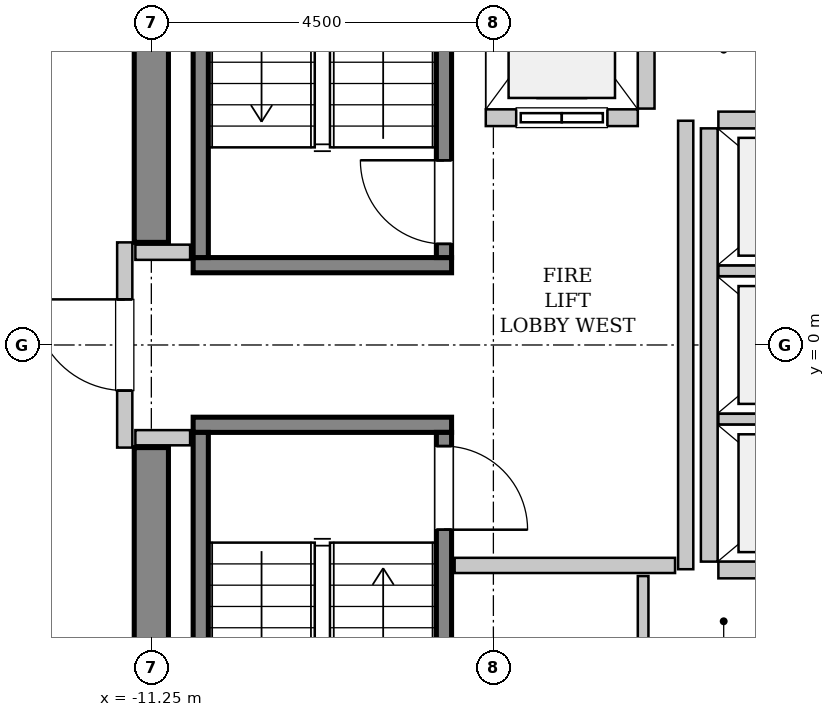
"""IFC4 building model, lengths in metres.
Left out: names, types, materials, properties, quantities, classifications, styles, units other than length and angle.
Written with IfcOpenShell. Run it as: python <this file> out.ifc"""

import sys

from ifc_helpers import new_model, si_unit, direction, frame, frame_2d, origin, place, context, subcontext, project, spatial, rectangle, extrude, source, transform, mapped, element, fill, save


model = new_model("IFC4")
c1 = context("Model", 3, precision=1e-05, world=origin(), true_north=direction((0.0, 1.0)))
c2 = subcontext(c1, "Body", "Model", "MODEL_VIEW")
j1 = project(units=[si_unit("LENGTHUNIT", "METRE"), si_unit("PLANEANGLEUNIT", "RADIAN")], contexts=[c1])
p1 = place(None, origin())
s1 = spatial("IfcSite", under=j1, at=p1, CompositionType="ELEMENT")
p2 = place(p1, origin())
s2 = spatial("IfcBuilding", under=s1, at=p2, CompositionType="ELEMENT")
p3 = place(p2, frame((0.0, 0.0, 264.6)))
s3 = spatial("IfcBuildingStorey", under=s2, at=p3, CompositionType="ELEMENT", Elevation=264.6)
m1 = source(origin(), c2, "Body", "SweptSolid", [
    extrude(rectangle(XDim=7.425, YDim=0.45, at=frame_2d((3.712, 0.0))), origin(), (0.0, 0.0, 1.0), 3.8),
])
for number, where, z_axis, x_axis in (
    (1, (-11.25, -8.775, 0.0), (0.0, 0.0, 1.0), (0.0, 1.0, 0.0)),
    (2, (-11.25, 1.35, 0.0), (0.0, 0.0, 1.0), (0.0, 1.0, 0.0)),
):
    element("IfcWall", number, at=place(p3, frame(where, z_axis=z_axis, x_axis=x_axis)), inside=s3, PredefinedType="SHEAR", context=c2, shape_type="MappedRepresentation", body=[
        mapped(m1, transform((0.0, 0.0, 0.0), x_axis=(1.0, 0.0, 0.0), y_axis=(0.0, 1.0, 0.0), z_axis=(0.0, 0.0, 1.0), scale=1.0)),
    ])
m2 = source(origin(), c2, "Body", "SweptSolid", [
    extrude(rectangle(XDim=3.4, YDim=0.2, at=frame_2d((1.7, 0.0))), origin(), (0.0, 0.0, 1.0), 3.8),
])
p4 = place(p3, frame((-7.3, 1.05, 0.0), z_axis=(0.0, 0.0, 1.0), x_axis=(-1.0, 0.0, 0.0)))
e3 = element("IfcWall", 3, at=p4, inside=s3, PredefinedType="SOLIDWALL", context=c2, shape_type="MappedRepresentation", body=[
    mapped(m2, transform((0.0, 0.0, 0.0), x_axis=(1.0, 0.0, 0.0), y_axis=(0.0, 1.0, 0.0), z_axis=(0.0, 0.0, 1.0), scale=1.0)),
])
m3 = source(origin(), c2, "Body", "SweptSolid", [
    extrude(rectangle(XDim=7.1, YDim=0.2, at=frame_2d((3.55, 0.0))), origin(), (0.0, 0.0, 1.0), 3.8),
])
p5 = place(p3, frame((-7.4, 1.15, 0.0), z_axis=(0.0, 0.0, 1.0), x_axis=(0.0, 1.0, 0.0)))
e4 = element("IfcWall", 4, at=p5, inside=s3, PredefinedType="SOLIDWALL", context=c2, shape_type="MappedRepresentation", body=[
    mapped(m3, transform((0.0, 0.0, 0.0), x_axis=(1.0, 0.0, 0.0), y_axis=(0.0, 1.0, 0.0), z_axis=(0.0, 0.0, 1.0), scale=1.0)),
])
p6 = place(p5, frame((0.18, 0.0, 0.0)))
e5 = element("IfcOpeningElement", 5, at=p6, cuts=e4, PredefinedType="OPENING", context=c2, shape_type="SweptSolid", body=[
    extrude(rectangle(XDim=1.1, YDim=2.15, at=frame_2d((0.55, 1.075))), frame((0.0, 0.11, 0.0), z_axis=(0.0, -1.0, 0.0), x_axis=(1.0, 0.0, 0.0)), (0.0, 0.0, 1.0), 0.22),
])
p7 = place(p3, frame((-10.6, 1.15, 0.0), z_axis=(0.0, 0.0, 1.0), x_axis=(0.0, 1.0, 0.0)))
e6 = element("IfcWall", 6, at=p7, inside=s3, PredefinedType="SOLIDWALL", context=c2, shape_type="MappedRepresentation", body=[
    mapped(m3, transform((0.0, 0.0, 0.0), x_axis=(1.0, 0.0, 0.0), y_axis=(0.0, 1.0, 0.0), z_axis=(0.0, 0.0, 1.0), scale=1.0)),
])
p8 = place(p3, frame((-10.7, -1.05, 0.0), z_axis=(0.0, 0.0, 1.0), x_axis=(1.0, 0.0, 0.0)))
e7 = element("IfcWall", 7, at=p8, inside=s3, PredefinedType="SOLIDWALL", context=c2, shape_type="MappedRepresentation", body=[
    mapped(m2, transform((0.0, 0.0, 0.0), x_axis=(1.0, 0.0, 0.0), y_axis=(0.0, 1.0, 0.0), z_axis=(0.0, 0.0, 1.0), scale=1.0)),
])
p9 = place(p3, frame((-10.6, -1.15, 0.0), z_axis=(0.0, 0.0, 1.0), x_axis=(0.0, -1.0, 0.0)))
e8 = element("IfcWall", 8, at=p9, inside=s3, PredefinedType="SOLIDWALL", context=c2, shape_type="MappedRepresentation", body=[
    mapped(m3, transform((0.0, 0.0, 0.0), x_axis=(1.0, 0.0, 0.0), y_axis=(0.0, 1.0, 0.0), z_axis=(0.0, 0.0, 1.0), scale=1.0)),
])
p10 = place(p3, frame((-7.4, -1.15, 0.0), z_axis=(0.0, 0.0, 1.0), x_axis=(0.0, -1.0, 0.0)))
e9 = element("IfcWall", 9, at=p10, inside=s3, PredefinedType="SOLIDWALL", context=c2, shape_type="MappedRepresentation", body=[
    mapped(m3, transform((0.0, 0.0, 0.0), x_axis=(1.0, 0.0, 0.0), y_axis=(0.0, 1.0, 0.0), z_axis=(0.0, 0.0, 1.0), scale=1.0)),
])
p11 = place(p10, frame((0.18, 0.0, 0.0)))
e10 = element("IfcOpeningElement", 10, at=p11, cuts=e9, PredefinedType="OPENING", context=c2, shape_type="SweptSolid", body=[
    extrude(rectangle(XDim=1.1, YDim=2.15, at=frame_2d((0.55, 1.075))), frame((0.0, 0.11, 0.0), z_axis=(0.0, -1.0, 0.0), x_axis=(1.0, 0.0, 0.0)), (0.0, 0.0, 1.0), 0.22),
])
m4 = source(origin(), c2, "Body", "SweptSolid", [
    extrude(rectangle(XDim=2.0, YDim=0.22, at=frame_2d((1.0, 0.0))), origin(), (0.0, 0.0, 1.0), 3.535),
])
p12 = place(p3, frame((-6.85, 2.99, 0.0), z_axis=(0.0, 0.0, 1.0), x_axis=(1.0, 0.0, 0.0)))
e11 = element("IfcWall", 11, at=p12, inside=s3, PredefinedType="SOLIDWALL", context=c2, shape_type="MappedRepresentation", body=[
    mapped(m4, transform((0.0, 0.0, 0.0), x_axis=(1.0, 0.0, 0.0), y_axis=(0.0, 1.0, 0.0), z_axis=(0.0, 0.0, 1.0), scale=1.0)),
])
p13 = place(p12, frame((0.4, 0.0, 0.0)))
e12 = element("IfcOpeningElement", 12, at=p13, cuts=e11, PredefinedType="OPENING", context=c2, shape_type="SweptSolid", body=[
    extrude(rectangle(XDim=1.2, YDim=2.2, at=frame_2d((0.6, 1.1))), frame((0.0, 0.12, 0.0), z_axis=(0.0, -1.0, 0.0), x_axis=(1.0, 0.0, 0.0)), (0.0, 0.0, 1.0), 0.24),
])
m5 = source(origin(), c2, "Body", "SweptSolid", [
    extrude(rectangle(XDim=2.68, YDim=0.22, at=frame_2d((1.34, 0.0))), origin(), (0.0, 0.0, 1.0), 3.535),
])
p14 = place(p3, frame((-4.74, 3.11, 0.0), z_axis=(0.0, 0.0, 1.0), x_axis=(0.0, 1.0, 0.0)))
e13 = element("IfcWall", 13, at=p14, inside=s3, PredefinedType="SOLIDWALL", context=c2, shape_type="MappedRepresentation", body=[
    mapped(m5, transform((0.0, 0.0, 0.0), x_axis=(1.0, 0.0, 0.0), y_axis=(0.0, 1.0, 0.0), z_axis=(0.0, 0.0, 1.0), scale=1.0)),
])
m6 = source(origin(), c2, "Body", "SweptSolid", [
    extrude(rectangle(XDim=5.7, YDim=0.22, at=frame_2d((2.85, 0.0))), origin(), (0.0, 0.0, 1.0), 3.535),
])
p15 = place(p3, frame((-3.91, 2.85, 0.0), z_axis=(0.0, 0.0, 1.0), x_axis=(0.0, -1.0, 0.0)))
e14 = element("IfcWall", 14, at=p15, inside=s3, PredefinedType="SOLIDWALL", context=c2, shape_type="MappedRepresentation", body=[
    mapped(m6, transform((0.0, 0.0, 0.0), x_axis=(1.0, 0.0, 0.0), y_axis=(0.0, 1.0, 0.0), z_axis=(0.0, 0.0, 1.0), scale=1.0)),
])
m7 = source(origin(), c2, "Body", "SweptSolid", [
    extrude(rectangle(XDim=2.13, YDim=0.22, at=frame_2d((1.065, 0.0))), origin(), (0.0, 0.0, 1.0), 3.535),
])
p16 = place(p3, frame((-3.79, -2.96, 0.0), z_axis=(0.0, 0.0, 1.0), x_axis=(1.0, 0.0, 0.0)))
e15 = element("IfcWall", 15, at=p16, inside=s3, PredefinedType="SOLIDWALL", context=c2, shape_type="MappedRepresentation", body=[
    mapped(m7, transform((0.0, 0.0, 0.0), x_axis=(1.0, 0.0, 0.0), y_axis=(0.0, 1.0, 0.0), z_axis=(0.0, 0.0, 1.0), scale=1.0)),
])
m8 = source(origin(), c2, "Body", "SweptSolid", [
    extrude(rectangle(XDim=2.13, YDim=0.14, at=frame_2d((1.065, 0.0))), origin(), (0.0, 0.0, 1.0), 3.535),
])
for number, where, z_axis, x_axis in (
    (16, (-3.79, -0.975, 0.0), (0.0, 0.0, 1.0), (1.0, 0.0, 0.0)),
    (17, (-3.79, 0.975, 0.0), (0.0, 0.0, 1.0), (1.0, 0.0, 0.0)),
):
    element("IfcWall", number, at=place(p3, frame(where, z_axis=z_axis, x_axis=x_axis)), inside=s3, PredefinedType="PARTITIONING", context=c2, shape_type="MappedRepresentation", body=[
        mapped(m8, transform((0.0, 0.0, 0.0), x_axis=(1.0, 0.0, 0.0), y_axis=(0.0, 1.0, 0.0), z_axis=(0.0, 0.0, 1.0), scale=1.0)),
    ])
p17 = place(p3, frame((-1.66, 2.96, 0.0), z_axis=(0.0, 0.0, 1.0), x_axis=(-1.0, 0.0, 0.0)))
e18 = element("IfcWall", 18, at=p17, inside=s3, PredefinedType="SOLIDWALL", context=c2, shape_type="MappedRepresentation", body=[
    mapped(m7, transform((0.0, 0.0, 0.0), x_axis=(1.0, 0.0, 0.0), y_axis=(0.0, 1.0, 0.0), z_axis=(0.0, 0.0, 1.0), scale=1.0)),
])
m9 = source(origin(), c2, "Body", "SweptSolid", [
    extrude(rectangle(XDim=2.7, YDim=0.2, at=frame_2d((1.35, 0.0))), origin(), (0.0, 0.0, 1.0), 2.625),
])
p18 = place(p3, frame((-11.6, -1.35, 0.0), z_axis=(0.0, 0.0, 1.0), x_axis=(0.0, 1.0, 0.0)))
e19 = element("IfcWall", 19, at=p18, inside=s3, PredefinedType="PARTITIONING", context=c2, shape_type="MappedRepresentation", body=[
    mapped(m9, transform((0.0, 0.0, 0.0), x_axis=(1.0, 0.0, 0.0), y_axis=(0.0, 1.0, 0.0), z_axis=(0.0, 0.0, 1.0), scale=1.0)),
])
p19 = place(p18, frame((0.75, 0.0, 0.0)))
e20 = element("IfcOpeningElement", 20, at=p19, cuts=e19, PredefinedType="OPENING", context=c2, shape_type="SweptSolid", body=[
    extrude(rectangle(XDim=1.2, YDim=2.15, at=frame_2d((0.6, 1.075))), frame((0.0, 0.11, 0.0), z_axis=(0.0, -1.0, 0.0), x_axis=(1.0, 0.0, 0.0)), (0.0, 0.0, 1.0), 0.22),
])
m10 = source(origin(), c2, "Body", "SweptSolid", [
    extrude(rectangle(XDim=5.9, YDim=0.2, at=frame_2d((2.95, 0.0))), origin(), (0.0, 0.0, 1.0), 3.535),
])
p20 = place(p3, frame((-4.22, -2.95, 0.0), z_axis=(0.0, 0.0, 1.0), x_axis=(0.0, 1.0, 0.0)))
e21 = element("IfcWall", 21, at=p20, inside=s3, PredefinedType="PARTITIONING", context=c2, shape_type="MappedRepresentation", body=[
    mapped(m10, transform((0.0, 0.0, 0.0), x_axis=(1.0, 0.0, 0.0), y_axis=(0.0, 1.0, 0.0), z_axis=(0.0, 0.0, 1.0), scale=1.0)),
])
m11 = source(origin(), c2, "Body", "SweptSolid", [
    extrude(rectangle(XDim=2.9, YDim=0.2, at=frame_2d((1.45, 0.0))), origin(), (0.0, 0.0, 1.0), 3.535),
])
p21 = place(p3, frame((-7.26, -2.9, 0.0), z_axis=(0.0, 0.0, 1.0), x_axis=(1.0, 0.0, 0.0)))
e22 = element("IfcWall", 22, at=p21, inside=s3, PredefinedType="PARTITIONING", context=c2, shape_type="MappedRepresentation", body=[
    mapped(m11, transform((0.0, 0.0, 0.0), x_axis=(1.0, 0.0, 0.0), y_axis=(0.0, 1.0, 0.0), z_axis=(0.0, 0.0, 1.0), scale=1.0)),
])
m12 = source(origin(), c2, "Body", "SweptSolid", [
    extrude(rectangle(XDim=0.72, YDim=0.2, at=frame_2d((0.36, 0.0))), origin(), (0.0, 0.0, 1.0), 3.535),
])
for number, where, z_axis, x_axis in (
    (23, (-11.46, 1.22, 0.0), (0.0, 0.0, 1.0), (1.0, 0.0, 0.0)),
    (24, (-11.46, -1.22, 0.0), (0.0, 0.0, 1.0), (1.0, 0.0, 0.0)),
):
    element("IfcWall", number, at=place(p3, frame(where, z_axis=z_axis, x_axis=x_axis)), inside=s3, PredefinedType="PARTITIONING", context=c2, shape_type="MappedRepresentation", body=[
        mapped(m12, transform((0.0, 0.0, 0.0), x_axis=(1.0, 0.0, 0.0), y_axis=(0.0, 1.0, 0.0), z_axis=(0.0, 0.0, 1.0), scale=1.0)),
    ])
m13 = source(origin(), c2, "Body", "SweptSolid", [
    extrude(rectangle(XDim=1.1, YDim=0.14, at=frame_2d((0.55, 0.0))), origin(), (0.0, 0.0, 1.0), 3.535),
])
p22 = place(p3, frame((-4.78, -4.14, 0.0), z_axis=(0.0, 0.0, 1.0), x_axis=(0.0, 1.0, 0.0)))
e25 = element("IfcWall", 25, at=p22, inside=s3, PredefinedType="PARTITIONING", context=c2, shape_type="MappedRepresentation", body=[
    mapped(m13, transform((0.0, 0.0, 0.0), x_axis=(1.0, 0.0, 0.0), y_axis=(0.0, 1.0, 0.0), z_axis=(0.0, 0.0, 1.0), scale=1.0)),
])
m14 = source(origin(), c2, "Body", "SweptSolid", [
    extrude(rectangle(XDim=1.1, YDim=2.15, at=frame_2d((0.55, 1.075))), frame((0.0, 0.025, 0.0), z_axis=(0.0, -1.0, 0.0), x_axis=(1.0, 0.0, 0.0)), (0.0, 0.0, 1.0), 0.05),
])
p23 = place(p6, origin())
e26 = element("IfcDoor", 26, at=p23, inside=s3, OperationType="SINGLE_SWING_RIGHT", PredefinedType="DOOR", context=c2, shape_type="MappedRepresentation", body=[
    mapped(m14, transform((0.0, 0.0, 0.0), x_axis=(1.0, 0.0, 0.0), y_axis=(0.0, 1.0, 0.0), z_axis=(0.0, 0.0, 1.0), scale=1.0)),
])
fill(e5, e26)
p24 = place(p11, origin())
e27 = element("IfcDoor", 27, at=p24, inside=s3, OperationType="SINGLE_SWING_RIGHT", PredefinedType="DOOR", context=c2, shape_type="MappedRepresentation", body=[
    mapped(m14, transform((0.0, 0.0, 0.0), x_axis=(1.0, 0.0, 0.0), y_axis=(0.0, 1.0, 0.0), z_axis=(0.0, 0.0, 1.0), scale=1.0)),
])
fill(e10, e27)
m15 = source(origin(), c2, "Body", "SweptSolid", [
    extrude(rectangle(XDim=1.2, YDim=2.2, at=frame_2d((0.6, 1.1))), frame((0.0, 0.025, 0.0), z_axis=(0.0, -1.0, 0.0), x_axis=(1.0, 0.0, 0.0)), (0.0, 0.0, 1.0), 0.05),
])
p25 = place(p13, origin())
e28 = element("IfcDoor", 28, at=p25, inside=s3, OperationType="SLIDING_TO_LEFT", PredefinedType="DOOR", context=c2, shape_type="MappedRepresentation", body=[
    mapped(m15, transform((0.0, 0.0, 0.0), x_axis=(1.0, 0.0, 0.0), y_axis=(0.0, 1.0, 0.0), z_axis=(0.0, 0.0, 1.0), scale=1.0)),
])
fill(e12, e28)
m16 = source(origin(), c2, "Body", "SweptSolid", [
    extrude(rectangle(XDim=1.2, YDim=2.15, at=frame_2d((0.6, 1.075))), frame((0.0, 0.025, 0.0), z_axis=(0.0, -1.0, 0.0), x_axis=(1.0, 0.0, 0.0)), (0.0, 0.0, 1.0), 0.05),
])
p26 = place(p19, origin())
e29 = element("IfcDoor", 29, at=p26, inside=s3, OperationType="SINGLE_SWING_RIGHT", PredefinedType="DOOR", context=c2, shape_type="MappedRepresentation", body=[
    mapped(m16, transform((0.0, 0.0, 0.0), x_axis=(1.0, 0.0, 0.0), y_axis=(0.0, 1.0, 0.0), z_axis=(0.0, 0.0, 1.0), scale=1.0)),
])
fill(e20, e29)
save(model, sys.argv[1])
